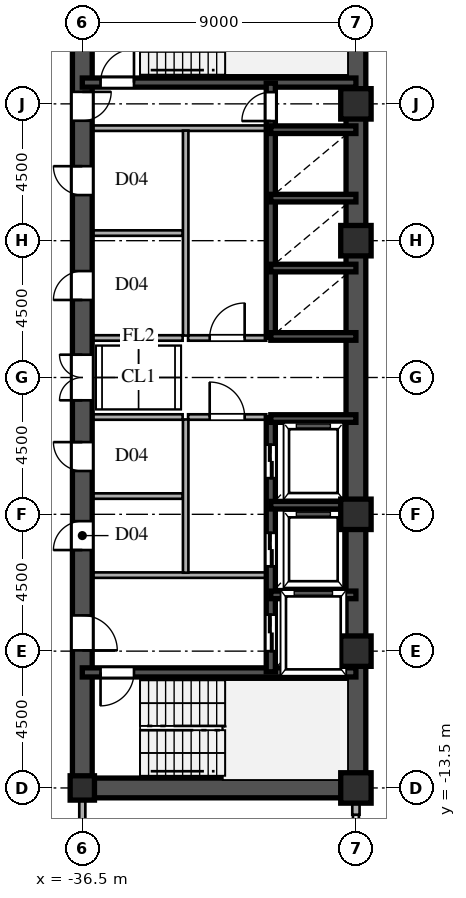
"""IFC4 building model, lengths in metres.
Left out: names, types, materials, properties, quantities, classifications, styles, units other than length and angle.
Written with IfcOpenShell. Run it as: python <this file> out.ifc"""

import sys

from ifc_helpers import new_model, si_unit, direction, frame, frame_2d, origin, origin_2d, place, context, subcontext, project, spatial, rectangle, hollow_rectangle, i_section, extrude, source, transform, mapped, element, fill, save


model = new_model("IFC4")
c1 = context("Model", 3, precision=1e-05, world=origin(), true_north=direction((0.0, 1.0)))
c2 = subcontext(c1, "Body", "Model", "MODEL_VIEW")
j1 = project(units=[si_unit("LENGTHUNIT", "METRE"), si_unit("PLANEANGLEUNIT", "RADIAN")], contexts=[c1])
p1 = place(None, origin())
s1 = spatial("IfcSite", under=j1, at=p1, CompositionType="ELEMENT")
p2 = place(p1, origin())
s2 = spatial("IfcBuilding", under=s1, at=p2, CompositionType="ELEMENT")
p3 = place(p2, frame((0.0, 0.0, 92.4)))
s3 = spatial("IfcBuildingStorey", under=s2, at=p3, CompositionType="ELEMENT", Elevation=92.4)
m1 = source(origin(), c2, "Body", "SweptSolid", [
    extrude(hollow_rectangle(XDim=1.0, YDim=1.0, WallThickness=0.042, at=origin_2d()), origin(), (0.0, 0.0, 1.0), 3.6),
])
for number, where, z_axis, x_axis in (
    (1, (-27.5, -13.5, 0.0), (0.0, 0.0, 1.0), (1.0, 0.0, 0.0)),
    (2, (-27.5, -9.0, 0.0), (0.0, 0.0, 1.0), (1.0, 0.0, 0.0)),
    (3, (-27.5, -4.5, 0.0), (0.0, 0.0, 1.0), (1.0, 0.0, 0.0)),
    (4, (-27.5, 4.5, 0.0), (0.0, 0.0, 1.0), (1.0, 0.0, 0.0)),
    (5, (-27.5, 9.0, 0.0), (0.0, 0.0, 1.0), (1.0, 0.0, 0.0)),
):
    element("IfcColumn", number, at=place(p3, frame(where, z_axis=z_axis, x_axis=x_axis)), inside=s3, PredefinedType="COLUMN", context=c2, shape_type="MappedRepresentation", body=[
        mapped(m1, transform((0.0, 0.0, 0.0), scale=1.0)),
    ])
m2 = source(origin(), c2, "Body", "SweptSolid", [
    extrude(i_section(OverallWidth=0.8, OverallDepth=0.8, WebThickness=0.032, FlangeThickness=0.05, at=origin_2d()), origin(), (0.0, 0.0, 1.0), 3.6),
])
p4 = place(p3, frame((-36.5, -13.5, 0.0), z_axis=(0.0, 0.0, 1.0), x_axis=(1.0, 0.0, 0.0)))
e6 = element("IfcColumn", 6, at=p4, inside=s3, PredefinedType="COLUMN", context=c2, shape_type="MappedRepresentation", body=[
    mapped(m2, transform((0.0, 0.0, 0.0), scale=1.0)),
])
p5 = place(p3, frame((-27.5, -14.38, 0.0), z_axis=(0.0, 0.0, 1.0), x_axis=(0.0, 1.0, 0.0)))
e7 = element("IfcWall", 7, at=p5, inside=s3, PredefinedType="SOLIDWALL", context=c2, shape_type="SweptSolid", body=[
    extrude(rectangle(XDim=0.55, YDim=0.24, at=frame_2d((0.275, 0.0))), origin(), (0.0, 0.0, 1.0), 2.88),
])
for number, where, z_axis, x_axis in (
    (8, (-27.5, -13.5, 0.0), (0.0, 0.0, 1.0), (0.0, 1.0, 0.0)),
    (9, (-27.5, 1.3, 0.0), (0.0, 0.0, 1.0), (0.0, 1.0, 0.0)),
):
    element("IfcWall", number, at=place(p3, frame(where, z_axis=z_axis, x_axis=x_axis)), inside=s3, PredefinedType="SHEAR", context=c2, shape_type="SweptSolid", body=[
        extrude(rectangle(XDim=12.2, YDim=0.65, at=frame_2d((6.1, 0.0))), origin(), (0.0, 0.0, 1.0), 3.38),
    ])
p6 = place(p3, frame((-27.5, -1.3, 0.0), z_axis=(0.0, 0.0, 1.0), x_axis=(0.0, 1.0, 0.0)))
e10 = element("IfcWall", 10, at=p6, inside=s3, PredefinedType="SHEAR", context=c2, shape_type="SweptSolid", body=[
    extrude(rectangle(XDim=2.6, YDim=0.65, at=frame_2d((1.3, 0.0))), origin(), (0.0, 0.0, 1.0), 3.38),
])
p7 = place(p3, frame((-36.5, -13.5, 0.0), z_axis=(0.0, 0.0, 1.0), x_axis=(1.0, 0.0, 0.0)))
e11 = element("IfcWall", 11, at=p7, inside=s3, PredefinedType="SHEAR", context=c2, shape_type="SweptSolid", body=[
    extrude(rectangle(XDim=9.0, YDim=0.65, at=frame_2d((4.5, 0.0))), origin(), (0.0, 0.0, 1.0), 3.38),
])
p8 = place(p3, frame((-36.5, -13.65, 0.0), z_axis=(0.0, 0.0, 1.0), x_axis=(0.0, 1.0, 0.0)))
e12 = element("IfcWall", 12, at=p8, inside=s3, PredefinedType="SHEAR", context=c2, shape_type="SweptSolid", body=[
    extrude(rectangle(XDim=7.15, YDim=0.65, at=frame_2d((3.575, 0.0))), origin(), (0.0, 0.0, 1.0), 3.38),
])
p9 = place(p8, frame((4.675, 0.0, 0.0)))
e13 = element("IfcOpeningElement", 13, at=p9, cuts=e12, PredefinedType="OPENING", context=c2, shape_type="SweptSolid", body=[
    extrude(rectangle(XDim=1.15, YDim=2.2, at=frame_2d((0.575, 1.1))), frame((0.0, 0.335, 0.0), z_axis=(0.0, -1.0, 0.0), x_axis=(1.0, 0.0, 0.0)), (0.0, 0.0, 1.0), 0.67),
])
p10 = place(p3, frame((-36.5, -1.3, 0.0), z_axis=(0.0, 0.0, 1.0), x_axis=(0.0, 1.0, 0.0)))
e14 = element("IfcWall", 14, at=p10, inside=s3, PredefinedType="SHEAR", context=c2, shape_type="SweptSolid", body=[
    extrude(rectangle(XDim=2.6, YDim=0.65, at=frame_2d((1.3, 0.0))), origin(), (0.0, 0.0, 1.0), 3.38),
])
p11 = place(p10, frame((0.55, 0.0, 0.0)))
e15 = element("IfcOpeningElement", 15, at=p11, cuts=e14, PredefinedType="OPENING", context=c2, shape_type="SweptSolid", body=[
    extrude(rectangle(XDim=1.5, YDim=2.3, at=frame_2d((0.75, 1.15))), frame((0.0, 0.335, 0.0), z_axis=(0.0, -1.0, 0.0), x_axis=(1.0, 0.0, 0.0)), (0.0, 0.0, 1.0), 0.67),
])
p12 = place(p3, frame((-36.5, 8.2, 0.0), z_axis=(0.0, 0.0, 1.0), x_axis=(0.0, 1.0, 0.0)))
e16 = element("IfcWall", 16, at=p12, inside=s3, PredefinedType="SHEAR", context=c2, shape_type="SweptSolid", body=[
    extrude(rectangle(XDim=5.45, YDim=0.65, at=frame_2d((2.725, 0.0))), origin(), (0.0, 0.0, 1.0), 3.38),
])
p13 = place(p12, frame((0.245, 0.0, 0.0)))
e17 = element("IfcOpeningElement", 17, at=p13, cuts=e16, PredefinedType="OPENING", context=c2, shape_type="SweptSolid", body=[
    extrude(rectangle(XDim=0.95, YDim=2.15, at=frame_2d((0.475, 1.075))), frame((0.0, 0.335, 0.0), z_axis=(0.0, -1.0, 0.0), x_axis=(1.0, 0.0, 0.0)), (0.0, 0.0, 1.0), 0.67),
])
p14 = place(p3, frame((-36.5, -6.5, 0.0), z_axis=(0.0, 0.0, 1.0), x_axis=(0.0, 1.0, 0.0)))
e18 = element("IfcWall", 18, at=p14, inside=s3, PredefinedType="SHEAR", context=c2, shape_type="SweptSolid", body=[
    extrude(rectangle(XDim=2.6, YDim=0.65, at=frame_2d((1.3, 0.0))), origin(), (0.0, 0.0, 1.0), 3.38),
])
p15 = place(p14, frame((0.825, 0.0, 0.0)))
e19 = element("IfcOpeningElement", 19, at=p15, cuts=e18, PredefinedType="OPENING", context=c2, shape_type="SweptSolid", body=[
    extrude(rectangle(XDim=0.95, YDim=2.15, at=frame_2d((0.475, 1.075))), frame((0.0, 0.335, 0.0), z_axis=(0.0, -1.0, 0.0), x_axis=(1.0, 0.0, 0.0)), (0.0, 0.0, 1.0), 0.67),
])
p16 = place(p3, frame((-36.5, -3.9, 0.0), z_axis=(0.0, 0.0, 1.0), x_axis=(0.0, 1.0, 0.0)))
e20 = element("IfcWall", 20, at=p16, inside=s3, PredefinedType="SHEAR", context=c2, shape_type="SweptSolid", body=[
    extrude(rectangle(XDim=2.6, YDim=0.65, at=frame_2d((1.3, 0.0))), origin(), (0.0, 0.0, 1.0), 3.38),
])
p17 = place(p16, frame((0.825, 0.0, 0.0)))
e21 = element("IfcOpeningElement", 21, at=p17, cuts=e20, PredefinedType="OPENING", context=c2, shape_type="SweptSolid", body=[
    extrude(rectangle(XDim=0.95, YDim=2.15, at=frame_2d((0.475, 1.075))), frame((0.0, 0.335, 0.0), z_axis=(0.0, -1.0, 0.0), x_axis=(1.0, 0.0, 0.0)), (0.0, 0.0, 1.0), 0.67),
])
p18 = place(p3, frame((-36.5, 1.3, 0.0), z_axis=(0.0, 0.0, 1.0), x_axis=(0.0, 1.0, 0.0)))
e22 = element("IfcWall", 22, at=p18, inside=s3, PredefinedType="SHEAR", context=c2, shape_type="SweptSolid", body=[
    extrude(rectangle(XDim=3.45, YDim=0.65, at=frame_2d((1.725, 0.0))), origin(), (0.0, 0.0, 1.0), 3.38),
])
p19 = place(p18, frame((1.25, 0.0, 0.0)))
e23 = element("IfcOpeningElement", 23, at=p19, cuts=e22, PredefinedType="OPENING", context=c2, shape_type="SweptSolid", body=[
    extrude(rectangle(XDim=0.95, YDim=2.15, at=frame_2d((0.475, 1.075))), frame((0.0, 0.335, 0.0), z_axis=(0.0, -1.0, 0.0), x_axis=(1.0, 0.0, 0.0)), (0.0, 0.0, 1.0), 0.67),
])
p20 = place(p3, frame((-36.5, 4.75, 0.0), z_axis=(0.0, 0.0, 1.0), x_axis=(0.0, 1.0, 0.0)))
e24 = element("IfcWall", 24, at=p20, inside=s3, PredefinedType="SHEAR", context=c2, shape_type="SweptSolid", body=[
    extrude(rectangle(XDim=3.45, YDim=0.65, at=frame_2d((1.725, 0.0))), origin(), (0.0, 0.0, 1.0), 3.38),
])
p21 = place(p20, frame((1.25, 0.0, 0.0)))
e25 = element("IfcOpeningElement", 25, at=p21, cuts=e24, PredefinedType="OPENING", context=c2, shape_type="SweptSolid", body=[
    extrude(rectangle(XDim=0.95, YDim=2.15, at=frame_2d((0.475, 1.075))), frame((0.0, 0.335, 0.0), z_axis=(0.0, -1.0, 0.0), x_axis=(1.0, 0.0, 0.0)), (0.0, 0.0, 1.0), 0.67),
])
p22 = place(p3, frame((-36.5, -9.7, 0.0), z_axis=(0.0, 0.0, 1.0), x_axis=(1.0, 0.0, 0.0)))
e26 = element("IfcWall", 26, at=p22, inside=s3, PredefinedType="SHEAR", context=c2, shape_type="SweptSolid", body=[
    extrude(rectangle(XDim=9.0, YDim=0.3, at=frame_2d((4.5, 0.0))), origin(), (0.0, 0.0, 1.0), 3.38),
])
p23 = place(p22, frame((0.6, 0.0, 0.0)))
e27 = element("IfcOpeningElement", 27, at=p23, cuts=e26, PredefinedType="OPENING", context=c2, shape_type="SweptSolid", body=[
    extrude(rectangle(XDim=1.1, YDim=2.2, at=frame_2d((0.55, 1.1))), frame((0.0, 0.16, 0.0), z_axis=(0.0, -1.0, 0.0), x_axis=(1.0, 0.0, 0.0)), (0.0, 0.0, 1.0), 0.32),
])
p24 = place(p3, frame((-36.5, 9.7, 0.0), z_axis=(0.0, 0.0, 1.0), x_axis=(1.0, 0.0, 0.0)))
e28 = element("IfcWall", 28, at=p24, inside=s3, PredefinedType="SHEAR", context=c2, shape_type="SweptSolid", body=[
    extrude(rectangle(XDim=9.0, YDim=0.3, at=frame_2d((4.5, 0.0))), origin(), (0.0, 0.0, 1.0), 3.38),
])
p25 = place(p24, frame((0.6, 0.0, 0.0)))
e29 = element("IfcOpeningElement", 29, at=p25, cuts=e28, PredefinedType="OPENING", context=c2, shape_type="SweptSolid", body=[
    extrude(rectangle(XDim=1.1, YDim=2.2, at=frame_2d((0.55, 1.1))), frame((0.0, 0.16, 0.0), z_axis=(0.0, -1.0, 0.0), x_axis=(1.0, 0.0, 0.0)), (0.0, 0.0, 1.0), 0.32),
])
for number, where, z_axis, x_axis in (
    (30, (-30.3, -7.15, 0.0), (0.0, 0.0, 1.0), (1.0, 0.0, 0.0)),
    (31, (-30.3, -4.2, 0.0), (0.0, 0.0, 1.0), (1.0, 0.0, 0.0)),
    (32, (-30.3, -1.35, 0.0), (0.0, 0.0, 1.0), (1.0, 0.0, 0.0)),
    (33, (-30.3, 1.35, 0.0), (0.0, 0.0, 1.0), (1.0, 0.0, 0.0)),
    (34, (-30.3, 3.6, 0.0), (0.0, 0.0, 1.0), (1.0, 0.0, 0.0)),
    (35, (-30.3, 5.9, 0.0), (0.0, 0.0, 1.0), (1.0, 0.0, 0.0)),
    (36, (-30.3, 8.15, 0.0), (0.0, 0.0, 1.0), (1.0, 0.0, 0.0)),
):
    element("IfcWall", number, at=place(p3, frame(where, z_axis=z_axis, x_axis=x_axis)), inside=s3, PredefinedType="SHEAR", context=c2, shape_type="SweptSolid", body=[
        extrude(rectangle(XDim=2.8, YDim=0.25, at=frame_2d((1.4, 0.0))), origin(), (0.0, 0.0, 1.0), 3.38),
    ])
p26 = place(p3, frame((-30.3, -9.68, 0.0), z_axis=(0.0, 0.0, 1.0), x_axis=(0.0, 1.0, 0.0)))
e37 = element("IfcWall", 37, at=p26, inside=s3, PredefinedType="SHEAR", context=c2, shape_type="SweptSolid", body=[
    extrude(rectangle(XDim=2.56, YDim=0.3, at=frame_2d((1.28, 0.0))), origin(), (0.0, 0.0, 1.0), 3.38),
])
p27 = place(p26, frame((0.68, 0.0, 0.0)))
e38 = element("IfcOpeningElement", 38, at=p27, cuts=e37, PredefinedType="OPENING", context=c2, shape_type="SweptSolid", body=[
    extrude(rectangle(XDim=1.2, YDim=2.25, at=frame_2d((0.6, 1.125))), frame((0.0, 0.16, 0.0), z_axis=(0.0, -1.0, 0.0), x_axis=(1.0, 0.0, 0.0)), (0.0, 0.0, 1.0), 0.32),
])
p28 = place(p3, frame((-30.3, -7.12, 0.0), z_axis=(0.0, 0.0, 1.0), x_axis=(0.0, 1.0, 0.0)))
e39 = element("IfcWall", 39, at=p28, inside=s3, PredefinedType="SHEAR", context=c2, shape_type="SweptSolid", body=[
    extrude(rectangle(XDim=2.92, YDim=0.3, at=frame_2d((1.46, 0.0))), origin(), (0.0, 0.0, 1.0), 3.38),
])
p29 = place(p28, frame((0.91, 0.0, 0.0)))
e40 = element("IfcOpeningElement", 40, at=p29, cuts=e39, PredefinedType="OPENING", context=c2, shape_type="SweptSolid", body=[
    extrude(rectangle(XDim=1.1, YDim=2.2, at=frame_2d((0.55, 1.1))), frame((0.0, 0.16, 0.0), z_axis=(0.0, -1.0, 0.0), x_axis=(1.0, 0.0, 0.0)), (0.0, 0.0, 1.0), 0.32),
])
p30 = place(p3, frame((-30.3, -4.2, 0.0), z_axis=(0.0, 0.0, 1.0), x_axis=(0.0, 1.0, 0.0)))
e41 = element("IfcWall", 41, at=p30, inside=s3, PredefinedType="SHEAR", context=c2, shape_type="SweptSolid", body=[
    extrude(rectangle(XDim=2.88, YDim=0.3, at=frame_2d((1.44, 0.0))), origin(), (0.0, 0.0, 1.0), 3.38),
])
p31 = place(p30, frame((0.89, 0.0, 0.0)))
e42 = element("IfcOpeningElement", 42, at=p31, cuts=e41, PredefinedType="OPENING", context=c2, shape_type="SweptSolid", body=[
    extrude(rectangle(XDim=1.1, YDim=2.2, at=frame_2d((0.55, 1.1))), frame((0.0, 0.16, 0.0), z_axis=(0.0, -1.0, 0.0), x_axis=(1.0, 0.0, 0.0)), (0.0, 0.0, 1.0), 0.32),
])
p32 = place(p3, frame((-30.3, 1.32, 0.0), z_axis=(0.0, 0.0, 1.0), x_axis=(0.0, 1.0, 0.0)))
e43 = element("IfcWall", 43, at=p32, inside=s3, PredefinedType="SHEAR", context=c2, shape_type="SweptSolid", body=[
    extrude(rectangle(XDim=2.28, YDim=0.3, at=frame_2d((1.14, 0.0))), origin(), (0.0, 0.0, 1.0), 3.38),
])
p33 = place(p3, frame((-30.3, 3.6, 0.0), z_axis=(0.0, 0.0, 1.0), x_axis=(0.0, 1.0, 0.0)))
e44 = element("IfcWall", 44, at=p33, inside=s3, PredefinedType="SHEAR", context=c2, shape_type="SweptSolid", body=[
    extrude(rectangle(XDim=2.3, YDim=0.3, at=frame_2d((1.15, 0.0))), origin(), (0.0, 0.0, 1.0), 3.38),
])
p34 = place(p3, frame((-30.3, 5.9, 0.0), z_axis=(0.0, 0.0, 1.0), x_axis=(0.0, 1.0, 0.0)))
e45 = element("IfcWall", 45, at=p34, inside=s3, PredefinedType="SHEAR", context=c2, shape_type="SweptSolid", body=[
    extrude(rectangle(XDim=2.25, YDim=0.3, at=frame_2d((1.125, 0.0))), origin(), (0.0, 0.0, 1.0), 3.38),
])
p35 = place(p3, frame((-30.3, 8.15, 0.0), z_axis=(0.0, 0.0, 1.0), x_axis=(0.0, 1.0, 0.0)))
e46 = element("IfcWall", 46, at=p35, inside=s3, PredefinedType="SHEAR", context=c2, shape_type="SweptSolid", body=[
    extrude(rectangle(XDim=1.53, YDim=0.3, at=frame_2d((0.765, 0.0))), origin(), (0.0, 0.0, 1.0), 3.38),
])
p36 = place(p35, frame((0.285, 0.0, 0.0)))
e47 = element("IfcOpeningElement", 47, at=p36, cuts=e46, PredefinedType="OPENING", context=c2, shape_type="SweptSolid", body=[
    extrude(rectangle(XDim=0.95, YDim=2.15, at=frame_2d((0.475, 1.075))), frame((0.0, 0.16, 0.0), z_axis=(0.0, -1.0, 0.0), x_axis=(1.0, 0.0, 0.0)), (0.0, 0.0, 1.0), 0.32),
])
for number, where, z_axis, x_axis in (
    (48, (-36.15, -6.5, 0.0), (0.0, 0.0, 1.0), (1.0, 0.0, 0.0)),
    (49, (-36.15, 8.2, 0.0), (0.0, 0.0, 1.0), (1.0, 0.0, 0.0)),
):
    element("IfcWall", number, at=place(p3, frame(where, z_axis=z_axis, x_axis=x_axis)), inside=s3, PredefinedType="PARTITIONING", context=c2, shape_type="SweptSolid", body=[
        extrude(rectangle(XDim=5.7, YDim=0.18, at=frame_2d((2.85, 0.0))), origin(), (0.0, 0.0, 1.0), 3.38),
    ])
p37 = place(p3, frame((-33.1, -6.42, 0.0), z_axis=(0.0, 0.0, 1.0), x_axis=(0.0, 1.0, 0.0)))
e50 = element("IfcWall", 50, at=p37, inside=s3, PredefinedType="PARTITIONING", context=c2, shape_type="SweptSolid", body=[
    extrude(rectangle(XDim=5.04, YDim=0.18, at=frame_2d((2.52, 0.0))), origin(), (0.0, 0.0, 1.0), 3.38),
])
p38 = place(p3, frame((-33.1, 1.38, 0.0), z_axis=(0.0, 0.0, 1.0), x_axis=(0.0, 1.0, 0.0)))
e51 = element("IfcWall", 51, at=p38, inside=s3, PredefinedType="PARTITIONING", context=c2, shape_type="SweptSolid", body=[
    extrude(rectangle(XDim=6.74, YDim=0.18, at=frame_2d((3.37, 0.0))), origin(), (0.0, 0.0, 1.0), 3.38),
])
p39 = place(p3, frame((-33.02, -1.3, 0.0), z_axis=(0.0, 0.0, 1.0), x_axis=(1.0, 0.0, 0.0)))
e52 = element("IfcWall", 52, at=p39, inside=s3, PredefinedType="PARTITIONING", context=c2, shape_type="SweptSolid", body=[
    extrude(rectangle(XDim=2.57, YDim=0.18, at=frame_2d((1.285, 0.0))), origin(), (0.0, 0.0, 1.0), 3.38),
])
p40 = place(p39, frame((0.71, 0.0, 0.0)))
e53 = element("IfcOpeningElement", 53, at=p40, cuts=e52, PredefinedType="OPENING", context=c2, shape_type="SweptSolid", body=[
    extrude(rectangle(XDim=1.15, YDim=2.2, at=frame_2d((0.575, 1.1))), frame((0.0, 0.1, 0.0), z_axis=(0.0, -1.0, 0.0), x_axis=(1.0, 0.0, 0.0)), (0.0, 0.0, 1.0), 0.2),
])
p41 = place(p3, frame((-33.02, 1.3, 0.0), z_axis=(0.0, 0.0, 1.0), x_axis=(1.0, 0.0, 0.0)))
e54 = element("IfcWall", 54, at=p41, inside=s3, PredefinedType="PARTITIONING", context=c2, shape_type="SweptSolid", body=[
    extrude(rectangle(XDim=2.57, YDim=0.18, at=frame_2d((1.285, 0.0))), origin(), (0.0, 0.0, 1.0), 3.38),
])
p42 = place(p41, frame((0.71, 0.0, 0.0)))
e55 = element("IfcOpeningElement", 55, at=p42, cuts=e54, PredefinedType="OPENING", context=c2, shape_type="SweptSolid", body=[
    extrude(rectangle(XDim=1.15, YDim=2.2, at=frame_2d((0.575, 1.1))), frame((0.0, 0.1, 0.0), z_axis=(0.0, -1.0, 0.0), x_axis=(1.0, 0.0, 0.0)), (0.0, 0.0, 1.0), 0.2),
])
for number, where, z_axis, x_axis in (
    (56, (-36.15, -1.3, 0.0), (0.0, 0.0, 1.0), (1.0, 0.0, 0.0)),
    (57, (-36.15, 1.3, 0.0), (0.0, 0.0, 1.0), (1.0, 0.0, 0.0)),
    (58, (-36.15, -3.9, 0.0), (0.0, 0.0, 1.0), (1.0, 0.0, 0.0)),
    (59, (-36.15, 4.75, 0.0), (0.0, 0.0, 1.0), (1.0, 0.0, 0.0)),
):
    element("IfcWall", number, at=place(p3, frame(where, z_axis=z_axis, x_axis=x_axis)), inside=s3, PredefinedType="PARTITIONING", context=c2, shape_type="SweptSolid", body=[
        extrude(rectangle(XDim=2.95, YDim=0.18, at=frame_2d((1.475, 0.0))), origin(), (0.0, 0.0, 1.0), 3.38),
    ])
p43 = place(p3, frame((-36.5, -15.515, 0.0), z_axis=(0.0, 0.0, 1.0), x_axis=(0.0, 1.0, 0.0)))
e60 = element("IfcWall", 60, at=p43, inside=s3, PredefinedType="PARTITIONING", context=c2, shape_type="SweptSolid", body=[
    extrude(rectangle(XDim=1.685, YDim=0.2, at=frame_2d((0.842, 0.0))), origin(), (0.0, 0.0, 1.0), 2.68),
])
m3 = source(origin(), c2, "Body", "SweptSolid", [
    extrude(rectangle(XDim=1.15, YDim=2.2, at=frame_2d((0.575, 1.1))), frame((0.0, 0.025, 0.0), z_axis=(0.0, -1.0, 0.0), x_axis=(1.0, 0.0, 0.0)), (0.0, 0.0, 1.0), 0.05),
])
p44 = place(p9, frame((1.15, 0.0, 0.0), z_axis=(0.0, 0.0, 1.0), x_axis=(-1.0, 0.0, 0.0)))
e61 = element("IfcDoor", 61, at=p44, inside=s3, OperationType="SINGLE_SWING_LEFT", PredefinedType="DOOR", context=c2, shape_type="MappedRepresentation", body=[
    mapped(m3, transform((0.0, 0.0, 0.0), scale=1.0)),
])
fill(e13, e61)
m4 = source(origin(), c2, "Body", "SweptSolid", [
    extrude(rectangle(XDim=1.5, YDim=2.3, at=frame_2d((0.75, 1.15))), frame((0.0, 0.025, 0.0), z_axis=(0.0, -1.0, 0.0), x_axis=(1.0, 0.0, 0.0)), (0.0, 0.0, 1.0), 0.05),
])
p45 = place(p11, origin())
e62 = element("IfcDoor", 62, at=p45, inside=s3, OperationType="DOUBLE_SWING_LEFT", PredefinedType="DOOR", context=c2, shape_type="MappedRepresentation", body=[
    mapped(m4, transform((0.0, 0.0, 0.0), scale=1.0)),
])
fill(e15, e62)
m5 = source(origin(), c2, "Body", "SweptSolid", [
    extrude(rectangle(XDim=0.95, YDim=2.15, at=frame_2d((0.475, 1.075))), frame((0.0, 0.025, 0.0), z_axis=(0.0, -1.0, 0.0), x_axis=(1.0, 0.0, 0.0)), (0.0, 0.0, 1.0), 0.05),
])
p46 = place(p13, frame((0.95, 0.0, 0.0), z_axis=(0.0, 0.0, 1.0), x_axis=(-1.0, 0.0, 0.0)))
e63 = element("IfcDoor", 63, at=p46, inside=s3, OperationType="SINGLE_SWING_RIGHT", PredefinedType="DOOR", context=c2, shape_type="MappedRepresentation", body=[
    mapped(m5, transform((0.0, 0.0, 0.0), scale=1.0)),
])
fill(e17, e63)
p47 = place(p15, origin())
e64 = element("IfcDoor", 64, at=p47, inside=s3, OperationType="SINGLE_SWING_LEFT", PredefinedType="DOOR", context=c2, shape_type="MappedRepresentation", body=[
    mapped(m5, transform((0.0, 0.0, 0.0), scale=1.0)),
])
fill(e19, e64)
p48 = place(p17, origin())
e65 = element("IfcDoor", 65, at=p48, inside=s3, OperationType="SINGLE_SWING_RIGHT", PredefinedType="DOOR", context=c2, shape_type="MappedRepresentation", body=[
    mapped(m5, transform((0.0, 0.0, 0.0), scale=1.0)),
])
fill(e21, e65)
p49 = place(p19, origin())
e66 = element("IfcDoor", 66, at=p49, inside=s3, OperationType="SINGLE_SWING_LEFT", PredefinedType="DOOR", context=c2, shape_type="MappedRepresentation", body=[
    mapped(m5, transform((0.0, 0.0, 0.0), scale=1.0)),
])
fill(e23, e66)
p50 = place(p21, origin())
e67 = element("IfcDoor", 67, at=p50, inside=s3, OperationType="SINGLE_SWING_RIGHT", PredefinedType="DOOR", context=c2, shape_type="MappedRepresentation", body=[
    mapped(m5, transform((0.0, 0.0, 0.0), scale=1.0)),
])
fill(e25, e67)
m6 = source(origin(), c2, "Body", "SweptSolid", [
    extrude(rectangle(XDim=1.1, YDim=2.2, at=frame_2d((0.55, 1.1))), frame((0.0, 0.025, 0.0), z_axis=(0.0, -1.0, 0.0), x_axis=(1.0, 0.0, 0.0)), (0.0, 0.0, 1.0), 0.05),
])
p51 = place(p23, frame((1.1, 0.0, 0.0), z_axis=(0.0, 0.0, 1.0), x_axis=(-1.0, 0.0, 0.0)))
e68 = element("IfcDoor", 68, at=p51, inside=s3, OperationType="SINGLE_SWING_LEFT", PredefinedType="DOOR", context=c2, shape_type="MappedRepresentation", body=[
    mapped(m6, transform((0.0, 0.0, 0.0), scale=1.0)),
])
fill(e27, e68)
p52 = place(p25, origin())
e69 = element("IfcDoor", 69, at=p52, inside=s3, OperationType="SINGLE_SWING_RIGHT", PredefinedType="DOOR", context=c2, shape_type="MappedRepresentation", body=[
    mapped(m6, transform((0.0, 0.0, 0.0), scale=1.0)),
])
fill(e29, e69)
m7 = source(origin(), c2, "Body", "SweptSolid", [
    extrude(rectangle(XDim=1.2, YDim=2.25, at=frame_2d((0.6, 1.125))), frame((0.0, 0.025, 0.0), z_axis=(0.0, -1.0, 0.0), x_axis=(1.0, 0.0, 0.0)), (0.0, 0.0, 1.0), 0.05),
])
p53 = place(p27, origin())
e70 = element("IfcDoor", 70, at=p53, inside=s3, OperationType="DOUBLE_DOOR_SLIDING", PredefinedType="DOOR", context=c2, shape_type="MappedRepresentation", body=[
    mapped(m7, transform((0.0, 0.0, 0.0), scale=1.0)),
])
fill(e38, e70)
m8 = source(origin(), c2, "Body", "SweptSolid", [
    extrude(rectangle(XDim=1.1, YDim=2.2, at=frame_2d((0.55, 1.1))), frame((0.0, 0.025, 0.0), z_axis=(0.0, -1.0, 0.0), x_axis=(1.0, 0.0, 0.0)), (0.0, 0.0, 1.0), 0.05),
])
p54 = place(p29, origin())
e71 = element("IfcDoor", 71, at=p54, inside=s3, OperationType="DOUBLE_DOOR_SLIDING", PredefinedType="DOOR", context=c2, shape_type="MappedRepresentation", body=[
    mapped(m8, transform((0.0, 0.0, 0.0), scale=1.0)),
])
fill(e40, e71)
p55 = place(p31, origin())
e72 = element("IfcDoor", 72, at=p55, inside=s3, OperationType="DOUBLE_DOOR_SLIDING", PredefinedType="DOOR", context=c2, shape_type="MappedRepresentation", body=[
    mapped(m8, transform((0.0, 0.0, 0.0), scale=1.0)),
])
fill(e42, e72)
p56 = place(p36, origin())
e73 = element("IfcDoor", 73, at=p56, inside=s3, OperationType="SINGLE_SWING_LEFT", PredefinedType="DOOR", context=c2, shape_type="MappedRepresentation", body=[
    mapped(m5, transform((0.0, 0.0, 0.0), scale=1.0)),
])
fill(e47, e73)
p57 = place(p40, origin())
e74 = element("IfcDoor", 74, at=p57, inside=s3, OperationType="SINGLE_SWING_LEFT", PredefinedType="DOOR", context=c2, shape_type="MappedRepresentation", body=[
    mapped(m3, transform((0.0, 0.0, 0.0), scale=1.0)),
])
fill(e53, e74)
p58 = place(p42, origin())
e75 = element("IfcDoor", 75, at=p58, inside=s3, OperationType="SINGLE_SWING_RIGHT", PredefinedType="DOOR", context=c2, shape_type="MappedRepresentation", body=[
    mapped(m3, transform((0.0, 0.0, 0.0), scale=1.0)),
])
fill(e55, e75)
save(model, sys.argv[1])
